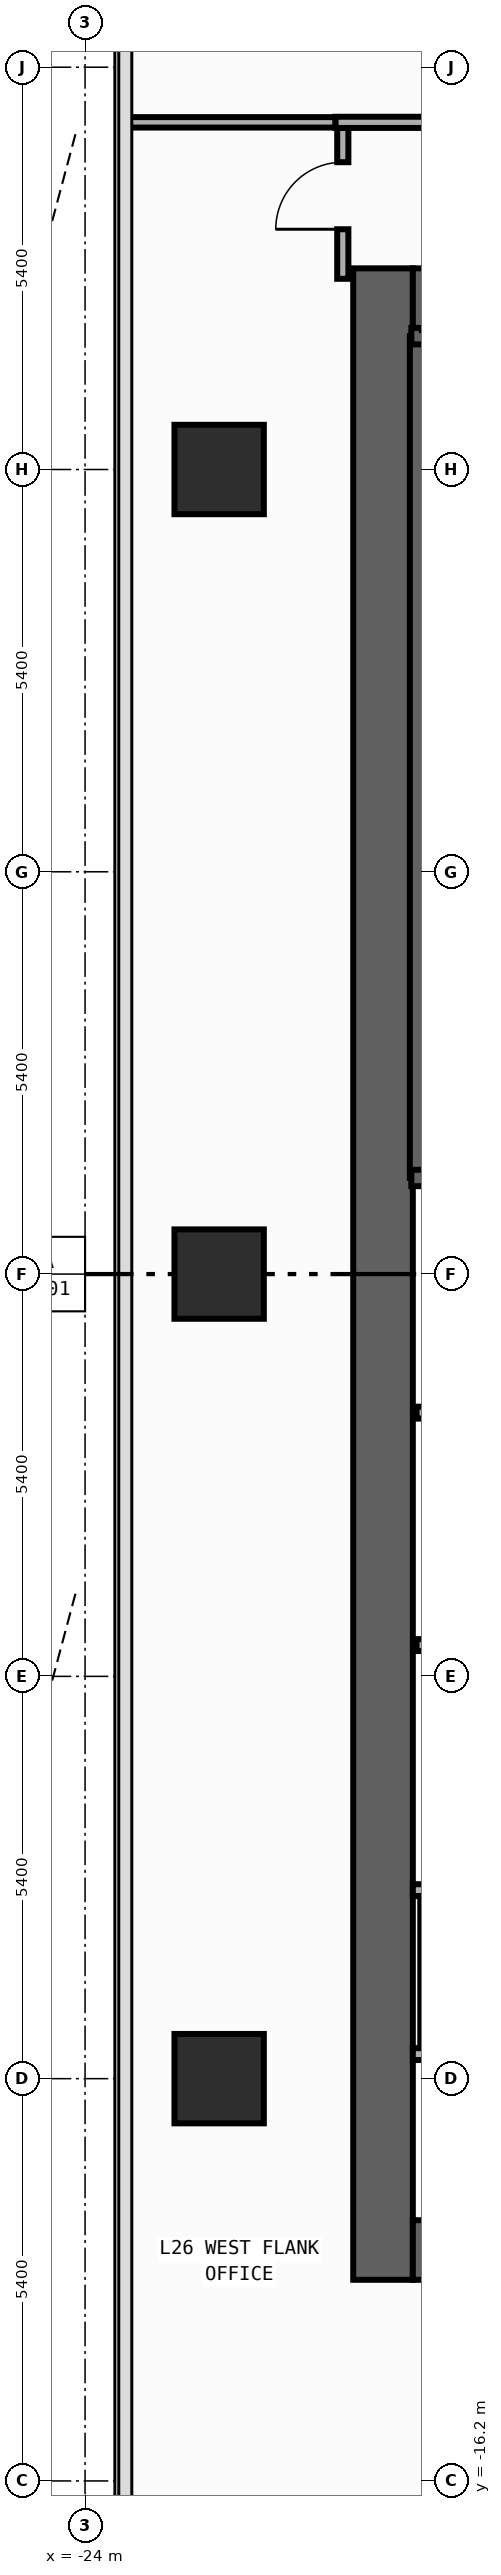
"""IFC4 building model, lengths in metres.
Left out: names, types, materials, properties, quantities, classifications, styles, units other than length and angle.
Written with IfcOpenShell. Run it as: python <this file> out.ifc"""

import sys

from ifc_helpers import new_model, si_unit, direction, frame, frame_2d, origin, origin_2d, place, context, subcontext, project, spatial, rectangle, extrude, element, fill, save


model = new_model("IFC4")
c1 = context("Model", 3, precision=1e-05, world=origin(), true_north=direction((0.0, 1.0)))
c2 = subcontext(c1, "Body", "Model", "MODEL_VIEW")
j1 = project(units=[si_unit("LENGTHUNIT", "METRE"), si_unit("PLANEANGLEUNIT", "RADIAN")], contexts=[c1])
p1 = place(None, origin())
s1 = spatial("IfcSite", under=j1, at=p1, CompositionType="ELEMENT")
p2 = place(p1, origin())
s2 = spatial("IfcBuilding", under=s1, at=p2, CompositionType="ELEMENT")
p3 = place(p2, frame((0.0, 0.0, 114.2)))
s3 = spatial("IfcBuildingStorey", under=s2, at=p3, CompositionType="ELEMENT", Elevation=114.2)
p4 = place(p3, frame((-20.0, -13.5, 0.0), z_axis=(0.0, 0.0, 1.0), x_axis=(0.0, 1.0, 0.0)))
e1 = element("IfcWall", 1, at=p4, inside=s3, PredefinedType="SHEAR", context=c2, shape_type="SweptSolid", body=[
    extrude(rectangle(XDim=27.0, YDim=0.8, at=frame_2d((13.5, 0.0))), origin(), (0.0, 0.0, 1.0), 3.94),
])
for number, where, z_axis, x_axis in (
    (2, (-19.6, -13.1, 0.0), (0.0, 0.0, 1.0), (1.0, 0.0, 0.0)),
    (3, (-19.6, 13.1, 0.0), (0.0, 0.0, 1.0), (1.0, 0.0, 0.0)),
):
    element("IfcWall", number, at=place(p3, frame(where, z_axis=z_axis, x_axis=x_axis)), inside=s3, PredefinedType="SHEAR", context=c2, shape_type="SweptSolid", body=[
        extrude(rectangle(XDim=6.8, YDim=0.8, at=frame_2d((3.4, 0.0))), origin(), (0.0, 0.0, 1.0), 3.94),
    ])
p5 = place(p3, frame((-19.53, 1.29, 0.0), z_axis=(0.0, 0.0, 1.0), x_axis=(0.0, 1.0, 0.0)))
e4 = element("IfcWall", 4, at=p5, inside=s3, PredefinedType="SHEAR", context=c2, shape_type="SweptSolid", body=[
    extrude(rectangle(XDim=11.3, YDim=0.22, at=frame_2d((5.65, 0.0))), origin(), (0.0, 0.0, 1.0), 3.94),
])
p6 = place(p3, frame((-19.62, 12.59, 0.0), z_axis=(0.0, 0.0, 1.0), x_axis=(1.0, 0.0, 0.0)))
e5 = element("IfcWall", 5, at=p6, inside=s3, PredefinedType="SHEAR", context=c2, shape_type="SweptSolid", body=[
    extrude(rectangle(XDim=3.915, YDim=0.22, at=frame_2d((1.958, 0.0))), origin(), (0.0, 0.0, 1.0), 3.94),
])
p7 = place(p3, frame((-19.62, 1.29, 0.0), z_axis=(0.0, 0.0, 1.0), x_axis=(1.0, 0.0, 0.0)))
e6 = element("IfcWall", 6, at=p7, inside=s3, PredefinedType="SHEAR", context=c2, shape_type="SweptSolid", body=[
    extrude(rectangle(XDim=3.915, YDim=0.22, at=frame_2d((1.958, 0.0))), origin(), (0.0, 0.0, 1.0), 3.94),
])
p8 = place(p7, frame((1.08, 0.0, 0.0)))
e7 = element("IfcOpeningElement", 7, at=p8, cuts=e6, PredefinedType="OPENING", context=c2, shape_type="SweptSolid", body=[
    extrude(rectangle(XDim=1.1, YDim=2.2, at=frame_2d((0.55, 1.1))), frame((0.0, 0.12, 0.0), z_axis=(0.0, -1.0, 0.0), x_axis=(1.0, 0.0, 0.0)), (0.0, 0.0, 1.0), 0.24),
])
for number, where, z_axis, x_axis in (
    (8, (-22.2, -10.8, 0.0), (0.0, 0.0, 1.0), (1.0, 0.0, 0.0)),
    (9, (-22.2, 0.0, 0.0), (0.0, 0.0, 1.0), (1.0, 0.0, 0.0)),
    (10, (-22.2, 10.8, 0.0), (0.0, 0.0, 1.0), (1.0, 0.0, 0.0)),
):
    element("IfcColumn", number, at=place(p3, frame(where, z_axis=z_axis, x_axis=x_axis)), inside=s3, PredefinedType="COLUMN", context=c2, shape_type="SweptSolid", body=[
        extrude(rectangle(XDim=1.2, YDim=1.2, at=origin_2d()), origin(), (0.0, 0.0, 1.0), 4.2),
    ])
p9 = place(p3, frame((-19.55, -1.86, 0.0), z_axis=(0.0, 0.0, 1.0), x_axis=(1.0, 0.0, 0.0)))
e11 = element("IfcWall", 11, at=p9, inside=s3, PredefinedType="STANDARD", context=c2, shape_type="SweptSolid", body=[
    extrude(rectangle(XDim=3.8, YDim=0.16, at=frame_2d((1.9, 0.0))), origin(), (0.0, 0.0, 1.0), 3.94),
])
p10 = place(p9, frame((1.18, 0.0, 0.0)))
e12 = element("IfcOpeningElement", 12, at=p10, cuts=e11, PredefinedType="OPENING", context=c2, shape_type="SweptSolid", body=[
    extrude(rectangle(XDim=1.15, YDim=2.2, at=frame_2d((0.575, 1.1))), frame((0.0, 0.09, 0.0), z_axis=(0.0, -1.0, 0.0), x_axis=(1.0, 0.0, 0.0)), (0.0, 0.0, 1.0), 0.18),
])
p11 = place(p3, frame((-19.55, -4.98, 0.0), z_axis=(0.0, 0.0, 1.0), x_axis=(1.0, 0.0, 0.0)))
e13 = element("IfcWall", 13, at=p11, inside=s3, PredefinedType="STANDARD", context=c2, shape_type="SweptSolid", body=[
    extrude(rectangle(XDim=3.8, YDim=0.16, at=frame_2d((1.9, 0.0))), origin(), (0.0, 0.0, 1.0), 3.94),
])
for number, where, z_axis, x_axis in (
    (14, (-19.6, -10.47, 0.0), (0.0, 0.0, 1.0), (1.0, 0.0, 0.0)),
    (15, (-19.6, -8.27, 0.0), (0.0, 0.0, 1.0), (1.0, 0.0, 0.0)),
):
    element("IfcWall", number, at=place(p3, frame(where, z_axis=z_axis, x_axis=x_axis)), inside=s3, PredefinedType="PARTITIONING", context=c2, shape_type="SweptSolid", body=[
        extrude(rectangle(XDim=2.29, YDim=0.16, at=frame_2d((1.145, 0.0))), origin(), (0.0, 0.0, 1.0), 3.94),
    ])
p12 = place(p3, frame((-20.54, 13.36, 0.0), z_axis=(0.0, 0.0, 1.0), x_axis=(0.0, 1.0, 0.0)))
e16 = element("IfcWall", 16, at=p12, inside=s3, PredefinedType="PARTITIONING", context=c2, shape_type="SweptSolid", body=[
    extrude(rectangle(XDim=2.025, YDim=0.15, at=frame_2d((1.012, 0.0))), origin(), (0.0, 0.0, 1.0), 3.94),
])
p13 = place(p12, frame((0.665, 0.0, 0.0)))
e17 = element("IfcOpeningElement", 17, at=p13, cuts=e16, PredefinedType="OPENING", context=c2, shape_type="SweptSolid", body=[
    extrude(rectangle(XDim=0.9, YDim=2.15, at=frame_2d((0.45, 1.075))), frame((0.0, 0.085, 0.0), z_axis=(0.0, -1.0, 0.0), x_axis=(1.0, 0.0, 0.0)), (0.0, 0.0, 1.0), 0.17),
])
p14 = place(p3, frame((-20.64, 15.46, 0.0), z_axis=(0.0, 0.0, 1.0), x_axis=(1.0, 0.0, 0.0)))
e18 = element("IfcWall", 18, at=p14, inside=s3, PredefinedType="PARTITIONING", context=c2, shape_type="SweptSolid", body=[
    extrude(rectangle(XDim=8.65, YDim=0.15, at=frame_2d((4.325, 0.0))), origin(), (0.0, 0.0, 1.0), 3.94),
])
p15 = place(p14, frame((2.871, 0.0, 0.0)))
e19 = element("IfcOpeningElement", 19, at=p15, cuts=e18, PredefinedType="OPENING", context=c2, shape_type="SweptSolid", body=[
    extrude(rectangle(XDim=0.9, YDim=2.15, at=frame_2d((0.45, 1.075))), frame((0.0, 0.085, 0.0), z_axis=(0.0, -1.0, 0.0), x_axis=(1.0, 0.0, 0.0)), (0.0, 0.0, 1.0), 0.17),
])
p16 = place(p3, frame((-23.455, 15.46, 0.0), z_axis=(0.0, 0.0, 1.0), x_axis=(1.0, 0.0, 0.0)))
e20 = element("IfcWall", 20, at=p16, inside=s3, PredefinedType="PARTITIONING", context=c2, shape_type="SweptSolid", body=[
    extrude(rectangle(XDim=2.815, YDim=0.14, at=frame_2d((1.408, 0.0))), origin(), (0.0, 0.0, 1.0), 3.94),
])
p17 = place(p3, frame((-19.45, -10.39, 0.0), z_axis=(0.0, 0.0, 1.0), x_axis=(0.0, 1.0, 0.0)))
e21 = element("IfcWall", 21, at=p17, inside=s3, PredefinedType="PARTITIONING", context=c2, shape_type="SweptSolid", body=[
    extrude(rectangle(XDim=2.04, YDim=0.1, at=frame_2d((1.02, 0.0))), origin(), (0.0, 0.0, 1.0), 3.94),
])
p18 = place(p13, origin())
e22 = element("IfcDoor", 22, at=p18, inside=s3, OperationType="SINGLE_SWING_LEFT", PredefinedType="DOOR", context=c2, shape_type="SweptSolid", body=[
    extrude(rectangle(XDim=0.9, YDim=2.15, at=frame_2d((0.45, 1.075))), frame((0.0, 0.025, 0.0), z_axis=(0.0, -1.0, 0.0), x_axis=(1.0, 0.0, 0.0)), (0.0, 0.0, 1.0), 0.05),
])
fill(e17, e22)
save(model, sys.argv[1])
